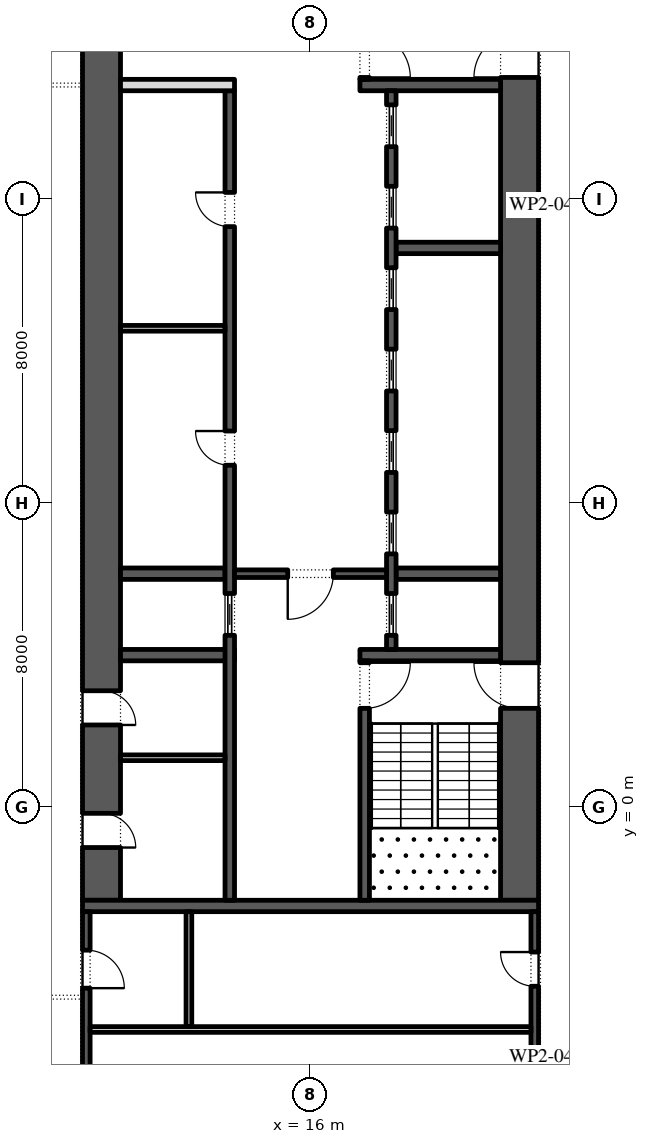
"""IFC4 building model, lengths in metres.
Left out: names, types, materials, properties, quantities, classifications, styles, units other than length and angle.
Written with IfcOpenShell. Run it as: python <this file> out.ifc"""

import sys

from ifc_helpers import new_model, si_unit, direction, frame, frame_2d, origin, place, context, subcontext, project, spatial, rectangle, extrude, element, fill, save


model = new_model("IFC4")
c1 = context("Model", 3, precision=1e-05, world=origin(), true_north=direction((0.0, 1.0)))
c2 = subcontext(c1, "Body", "Model", "MODEL_VIEW")
j1 = project(units=[si_unit("LENGTHUNIT", "METRE"), si_unit("PLANEANGLEUNIT", "RADIAN")], contexts=[c1])
p1 = place(None, origin())
s1 = spatial("IfcSite", under=j1, at=p1, CompositionType="ELEMENT")
p2 = place(p1, origin())
s2 = spatial("IfcBuilding", under=s1, at=p2, CompositionType="ELEMENT")
p3 = place(p2, frame((0.0, 0.0, 64.8)))
s3 = spatial("IfcBuildingStorey", under=s2, at=p3, CompositionType="ELEMENT", Elevation=64.8)
p4 = place(p3, frame((21.5, -2.45, 0.0), z_axis=(0.0, 0.0, 1.0), x_axis=(0.0, 1.0, 0.0)))
e1 = element("IfcWall", 1, at=p4, inside=s3, PredefinedType="SHEAR", context=c2, shape_type="SweptSolid", body=[
    extrude(rectangle(XDim=27.9, YDim=1.0, at=frame_2d((13.95, 0.0))), origin(), (0.0, 0.0, 1.0), 4.0),
])
p5 = place(p4, frame((5.05, 0.0, 0.0)))
e2 = element("IfcOpeningElement", 2, at=p5, cuts=e1, PredefinedType="OPENING", context=c2, shape_type="SweptSolid", body=[
    extrude(rectangle(XDim=1.2, YDim=2.1, at=frame_2d((0.6, 1.05))), frame((0.0, 0.51, 0.0), z_axis=(0.0, -1.0, 0.0), x_axis=(1.0, 0.0, 0.0)), (0.0, 0.0, 1.0), 1.02),
])
p6 = place(p4, frame((21.65, 0.0, 0.0)))
e3 = element("IfcOpeningElement", 3, at=p6, cuts=e1, PredefinedType="OPENING", context=c2, shape_type="SweptSolid", body=[
    extrude(rectangle(XDim=1.2, YDim=2.1, at=frame_2d((0.6, 1.05))), frame((0.0, 0.51, 0.0), z_axis=(0.0, -1.0, 0.0), x_axis=(1.0, 0.0, 0.0)), (0.0, 0.0, 1.0), 1.02),
])
p7 = place(p3, frame((10.5, -2.45, 0.0), z_axis=(0.0, 0.0, 1.0), x_axis=(0.0, 1.0, 0.0)))
e4 = element("IfcWall", 4, at=p7, inside=s3, PredefinedType="SHEAR", context=c2, shape_type="SweptSolid", body=[
    extrude(rectangle(XDim=27.9, YDim=1.0, at=frame_2d((13.95, 0.0))), origin(), (0.0, 0.0, 1.0), 4.0),
])
p8 = place(p7, frame((23.65, 0.0, 0.0)))
e5 = element("IfcOpeningElement", 5, at=p8, cuts=e4, PredefinedType="OPENING", context=c2, shape_type="SweptSolid", body=[
    extrude(rectangle(XDim=2.4, YDim=2.1, at=frame_2d((1.2, 1.05))), frame((0.0, 0.51, 0.0), z_axis=(0.0, -1.0, 0.0), x_axis=(1.0, 0.0, 0.0)), (0.0, 0.0, 1.0), 1.02),
])
p9 = place(p7, frame((1.387, 0.0, 0.0)))
e6 = element("IfcOpeningElement", 6, at=p9, cuts=e4, PredefinedType="OPENING", context=c2, shape_type="SweptSolid", body=[
    extrude(rectangle(XDim=0.9, YDim=2.1, at=frame_2d((0.45, 1.05))), frame((0.0, 0.51, 0.0), z_axis=(0.0, -1.0, 0.0), x_axis=(1.0, 0.0, 0.0)), (0.0, 0.0, 1.0), 1.02),
])
p10 = place(p7, frame((4.613, 0.0, 0.0)))
e7 = element("IfcOpeningElement", 7, at=p10, cuts=e4, PredefinedType="OPENING", context=c2, shape_type="SweptSolid", body=[
    extrude(rectangle(XDim=0.9, YDim=2.1, at=frame_2d((0.45, 1.05))), frame((0.0, 0.51, 0.0), z_axis=(0.0, -1.0, 0.0), x_axis=(1.0, 0.0, 0.0)), (0.0, 0.0, 1.0), 1.02),
])
p11 = place(p3, frame((10.0, -2.6, 0.0), z_axis=(0.0, 0.0, 1.0), x_axis=(1.0, 0.0, 0.0)))
e8 = element("IfcWall", 8, at=p11, inside=s3, PredefinedType="SHEAR", context=c2, shape_type="SweptSolid", body=[
    extrude(rectangle(XDim=12.0, YDim=0.3, at=frame_2d((6.0, 0.0))), origin(), (0.0, 0.0, 1.0), 4.0),
])
p12 = place(p3, frame((17.3, 4.0, 0.0), z_axis=(0.0, 0.0, 1.0), x_axis=(1.0, 0.0, 0.0)))
e9 = element("IfcWall", 9, at=p12, inside=s3, PredefinedType="SHEAR", context=c2, shape_type="SweptSolid", body=[
    extrude(rectangle(XDim=3.7, YDim=0.3, at=frame_2d((1.85, 0.0))), origin(), (0.0, 0.0, 1.0), 4.0),
])
p13 = place(p3, frame((17.425, -2.45, 0.0), z_axis=(0.0, 0.0, 1.0), x_axis=(0.0, 1.0, 0.0)))
e10 = element("IfcWall", 10, at=p13, inside=s3, PredefinedType="SHEAR", context=c2, shape_type="SweptSolid", body=[
    extrude(rectangle(XDim=6.3, YDim=0.25, at=frame_2d((3.15, 0.0))), origin(), (0.0, 0.0, 1.0), 4.0),
])
p14 = place(p13, frame((5.05, 0.0, 0.0)))
e11 = element("IfcOpeningElement", 11, at=p14, cuts=e10, PredefinedType="OPENING", context=c2, shape_type="SweptSolid", body=[
    extrude(rectangle(XDim=1.2, YDim=2.1, at=frame_2d((0.6, 1.05))), frame((0.0, 0.135, 0.0), z_axis=(0.0, -1.0, 0.0), x_axis=(1.0, 0.0, 0.0)), (0.0, 0.0, 1.0), 0.27),
])
p15 = place(p3, frame((17.3, 19.0, 0.0), z_axis=(0.0, 0.0, 1.0), x_axis=(1.0, 0.0, 0.0)))
e12 = element("IfcWall", 12, at=p15, inside=s3, PredefinedType="SHEAR", context=c2, shape_type="SweptSolid", body=[
    extrude(rectangle(XDim=3.7, YDim=0.3, at=frame_2d((1.85, 0.0))), origin(), (0.0, 0.0, 1.0), 4.0),
])
p16 = place(p3, frame((17.425, 19.15, 0.0), z_axis=(0.0, 0.0, 1.0), x_axis=(0.0, 1.0, 0.0)))
e13 = element("IfcWall", 13, at=p16, inside=s3, PredefinedType="SHEAR", context=c2, shape_type="SweptSolid", body=[
    extrude(rectangle(XDim=6.3, YDim=0.25, at=frame_2d((3.15, 0.0))), origin(), (0.0, 0.0, 1.0), 4.0),
])
p17 = place(p16, frame((0.05, 0.0, 0.0)))
e14 = element("IfcOpeningElement", 14, at=p17, cuts=e13, PredefinedType="OPENING", context=c2, shape_type="SweptSolid", body=[
    extrude(rectangle(XDim=1.2, YDim=2.1, at=frame_2d((0.6, 1.05))), frame((0.0, 0.135, 0.0), z_axis=(0.0, -1.0, 0.0), x_axis=(1.0, 0.0, 0.0)), (0.0, 0.0, 1.0), 0.27),
])
for number, where, z_axis, x_axis in (
    (15, (18.25, 6.143, 0.0), (0.0, 0.0, 1.0), (1.0, 0.0, 0.0)),
    (16, (18.25, 14.714, 0.0), (0.0, 0.0, 1.0), (1.0, 0.0, 0.0)),
):
    element("IfcWall", number, at=place(p3, frame(where, z_axis=z_axis, x_axis=x_axis)), inside=s3, PredefinedType="SHEAR", context=c2, shape_type="SweptSolid", body=[
        extrude(rectangle(XDim=2.75, YDim=0.3, at=frame_2d((1.375, 0.0))), origin(), (0.0, 0.0, 1.0), 4.0),
    ])
p18 = place(p3, frame((18.125, 4.15, 0.0), z_axis=(0.0, 0.0, 1.0), x_axis=(0.0, 1.0, 0.0)))
e17 = element("IfcWall", 17, at=p18, inside=s3, PredefinedType="SHEAR", context=c2, shape_type="SweptSolid", body=[
    extrude(rectangle(XDim=14.7, YDim=0.25, at=frame_2d((7.35, 0.0))), origin(), (0.0, 0.0, 1.0), 4.0),
])
p19 = place(p18, frame((0.371, 0.0, 0.0)))
e18 = element("IfcOpeningElement", 18, at=p19, cuts=e17, PredefinedType="OPENING", context=c2, shape_type="SweptSolid", body=[
    extrude(rectangle(XDim=1.1, YDim=2.1, at=frame_2d((0.55, 1.05))), frame((0.0, 0.135, 0.0), z_axis=(0.0, -1.0, 0.0), x_axis=(1.0, 0.0, 0.0)), (0.0, 0.0, 1.0), 0.27),
])
p20 = place(p18, frame((2.514, 0.0, 0.0)))
e19 = element("IfcOpeningElement", 19, at=p20, cuts=e17, PredefinedType="OPENING", context=c2, shape_type="SweptSolid", body=[
    extrude(rectangle(XDim=1.1, YDim=2.1, at=frame_2d((0.55, 1.05))), frame((0.0, 0.135, 0.0), z_axis=(0.0, -1.0, 0.0), x_axis=(1.0, 0.0, 0.0)), (0.0, 0.0, 1.0), 0.27),
])
p21 = place(p18, frame((4.657, 0.0, 0.0)))
e20 = element("IfcOpeningElement", 20, at=p21, cuts=e17, PredefinedType="OPENING", context=c2, shape_type="SweptSolid", body=[
    extrude(rectangle(XDim=1.1, YDim=2.1, at=frame_2d((0.55, 1.05))), frame((0.0, 0.135, 0.0), z_axis=(0.0, -1.0, 0.0), x_axis=(1.0, 0.0, 0.0)), (0.0, 0.0, 1.0), 0.27),
])
p22 = place(p18, frame((6.8, 0.0, 0.0)))
e21 = element("IfcOpeningElement", 21, at=p22, cuts=e17, PredefinedType="OPENING", context=c2, shape_type="SweptSolid", body=[
    extrude(rectangle(XDim=1.1, YDim=2.1, at=frame_2d((0.55, 1.05))), frame((0.0, 0.135, 0.0), z_axis=(0.0, -1.0, 0.0), x_axis=(1.0, 0.0, 0.0)), (0.0, 0.0, 1.0), 0.27),
])
p23 = place(p18, frame((8.943, 0.0, 0.0)))
e22 = element("IfcOpeningElement", 22, at=p23, cuts=e17, PredefinedType="OPENING", context=c2, shape_type="SweptSolid", body=[
    extrude(rectangle(XDim=1.1, YDim=2.1, at=frame_2d((0.55, 1.05))), frame((0.0, 0.135, 0.0), z_axis=(0.0, -1.0, 0.0), x_axis=(1.0, 0.0, 0.0)), (0.0, 0.0, 1.0), 0.27),
])
p24 = place(p18, frame((11.086, 0.0, 0.0)))
e23 = element("IfcOpeningElement", 23, at=p24, cuts=e17, PredefinedType="OPENING", context=c2, shape_type="SweptSolid", body=[
    extrude(rectangle(XDim=1.1, YDim=2.1, at=frame_2d((0.55, 1.05))), frame((0.0, 0.135, 0.0), z_axis=(0.0, -1.0, 0.0), x_axis=(1.0, 0.0, 0.0)), (0.0, 0.0, 1.0), 0.27),
])
p25 = place(p18, frame((13.229, 0.0, 0.0)))
e24 = element("IfcOpeningElement", 24, at=p25, cuts=e17, PredefinedType="OPENING", context=c2, shape_type="SweptSolid", body=[
    extrude(rectangle(XDim=1.1, YDim=2.1, at=frame_2d((0.55, 1.05))), frame((0.0, 0.135, 0.0), z_axis=(0.0, -1.0, 0.0), x_axis=(1.0, 0.0, 0.0)), (0.0, 0.0, 1.0), 0.27),
])
p26 = place(p3, frame((11.0, 4.0, 0.0), z_axis=(0.0, 0.0, 1.0), x_axis=(1.0, 0.0, 0.0)))
e25 = element("IfcWall", 25, at=p26, inside=s3, PredefinedType="SHEAR", context=c2, shape_type="SweptSolid", body=[
    extrude(rectangle(XDim=3.0, YDim=0.3, at=frame_2d((1.5, 0.0))), origin(), (0.0, 0.0, 1.0), 4.0),
])
p27 = place(p3, frame((11.0, 6.143, 0.0), z_axis=(0.0, 0.0, 1.0), x_axis=(1.0, 0.0, 0.0)))
e26 = element("IfcWall", 26, at=p27, inside=s3, PredefinedType="SHEAR", context=c2, shape_type="SweptSolid", body=[
    extrude(rectangle(XDim=2.75, YDim=0.3, at=frame_2d((1.375, 0.0))), origin(), (0.0, 0.0, 1.0), 4.0),
])
p28 = place(p3, frame((13.875, -2.45, 0.0), z_axis=(0.0, 0.0, 1.0), x_axis=(0.0, 1.0, 0.0)))
e27 = element("IfcWall", 27, at=p28, inside=s3, PredefinedType="SHEAR", context=c2, shape_type="SweptSolid", body=[
    extrude(rectangle(XDim=21.3, YDim=0.25, at=frame_2d((10.65, 0.0))), origin(), (0.0, 0.0, 1.0), 4.0),
])
p29 = place(p28, frame((11.446, 0.0, 0.0)))
e28 = element("IfcOpeningElement", 28, at=p29, cuts=e27, PredefinedType="OPENING", context=c2, shape_type="SweptSolid", body=[
    extrude(rectangle(XDim=0.9, YDim=2.1, at=frame_2d((0.45, 1.05))), frame((0.0, 0.135, 0.0), z_axis=(0.0, -1.0, 0.0), x_axis=(1.0, 0.0, 0.0)), (0.0, 0.0, 1.0), 0.27),
])
p30 = place(p28, frame((17.725, 0.0, 0.0)))
e29 = element("IfcOpeningElement", 29, at=p30, cuts=e27, PredefinedType="OPENING", context=c2, shape_type="SweptSolid", body=[
    extrude(rectangle(XDim=0.9, YDim=2.1, at=frame_2d((0.45, 1.05))), frame((0.0, 0.135, 0.0), z_axis=(0.0, -1.0, 0.0), x_axis=(1.0, 0.0, 0.0)), (0.0, 0.0, 1.0), 0.27),
])
p31 = place(p28, frame((6.971, 0.0, 0.0)))
e30 = element("IfcOpeningElement", 30, at=p31, cuts=e27, PredefinedType="OPENING", context=c2, shape_type="SweptSolid", body=[
    extrude(rectangle(XDim=1.1, YDim=2.1, at=frame_2d((0.55, 1.05))), frame((0.0, 0.135, 0.0), z_axis=(0.0, -1.0, 0.0), x_axis=(1.0, 0.0, 0.0)), (0.0, 0.0, 1.0), 0.27),
])
p32 = place(p3, frame((11.0, 19.0, 0.0), z_axis=(0.0, 0.0, 1.0), x_axis=(1.0, 0.0, 0.0)))
e31 = element("IfcWall", 31, at=p32, inside=s3, PredefinedType="PARTITIONING", context=c2, shape_type="SweptSolid", body=[
    extrude(rectangle(XDim=3.0, YDim=0.3, at=frame_2d((1.5, 0.0))), origin(), (0.0, 0.0, 1.0), 4.0),
])
p33 = place(p3, frame((11.0, 12.6, 0.0), z_axis=(0.0, 0.0, 1.0), x_axis=(1.0, 0.0, 0.0)))
e32 = element("IfcWall", 32, at=p33, inside=s3, PredefinedType="PARTITIONING", context=c2, shape_type="SweptSolid", body=[
    extrude(rectangle(XDim=2.75, YDim=0.15, at=frame_2d((1.375, 0.0))), origin(), (0.0, 0.0, 1.0), 4.0),
])
p34 = place(p3, frame((14.0, 6.143, 0.0), z_axis=(0.0, 0.0, 1.0), x_axis=(1.0, 0.0, 0.0)))
e33 = element("IfcWall", 33, at=p34, inside=s3, PredefinedType="SHEAR", context=c2, shape_type="SweptSolid", body=[
    extrude(rectangle(XDim=4.0, YDim=0.2, at=frame_2d((2.0, 0.0))), origin(), (0.0, 0.0, 1.0), 4.0),
])
p35 = place(p34, frame((1.4, 0.0, 0.0)))
e34 = element("IfcOpeningElement", 34, at=p35, cuts=e33, PredefinedType="OPENING", context=c2, shape_type="SweptSolid", body=[
    extrude(rectangle(XDim=1.2, YDim=2.1, at=frame_2d((0.6, 1.05))), frame((0.0, 0.11, 0.0), z_axis=(0.0, -1.0, 0.0), x_axis=(1.0, 0.0, 0.0)), (0.0, 0.0, 1.0), 0.22),
])
p36 = place(p3, frame((11.0, 1.3, 0.0), z_axis=(0.0, 0.0, 1.0), x_axis=(1.0, 0.0, 0.0)))
e35 = element("IfcWall", 35, at=p36, inside=s3, PredefinedType="PARTITIONING", context=c2, shape_type="SweptSolid", body=[
    extrude(rectangle(XDim=2.75, YDim=0.15, at=frame_2d((1.375, 0.0))), origin(), (0.0, 0.0, 1.0), 4.0),
])
p37 = place(p3, frame((21.9, -15.8, 0.0), z_axis=(0.0, 0.0, 1.0), x_axis=(0.0, 1.0, 0.0)))
e36 = element("IfcWall", 36, at=p37, inside=s3, PredefinedType="SHEAR", context=c2, shape_type="SweptSolid", body=[
    extrude(rectangle(XDim=13.05, YDim=0.2, at=frame_2d((6.525, 0.0))), origin(), (0.0, 0.0, 1.0), 4.0),
])
p38 = place(p37, frame((11.087, 0.0, 0.0)))
e37 = element("IfcOpeningElement", 37, at=p38, cuts=e36, PredefinedType="OPENING", context=c2, shape_type="SweptSolid", body=[
    extrude(rectangle(XDim=0.9, YDim=2.1, at=frame_2d((0.45, 1.05))), frame((0.0, 0.11, 0.0), z_axis=(0.0, -1.0, 0.0), x_axis=(1.0, 0.0, 0.0)), (0.0, 0.0, 1.0), 0.22),
])
p39 = place(p3, frame((10.1, -15.8, 0.0), z_axis=(0.0, 0.0, 1.0), x_axis=(0.0, 1.0, 0.0)))
e38 = element("IfcWall", 38, at=p39, inside=s3, PredefinedType="SHEAR", context=c2, shape_type="SweptSolid", body=[
    extrude(rectangle(XDim=13.05, YDim=0.2, at=frame_2d((6.525, 0.0))), origin(), (0.0, 0.0, 1.0), 4.0),
])
p40 = place(p39, frame((4.488, 0.0, 0.0)))
e39 = element("IfcOpeningElement", 39, at=p40, cuts=e38, PredefinedType="OPENING", context=c2, shape_type="SweptSolid", body=[
    extrude(rectangle(XDim=0.9, YDim=2.1, at=frame_2d((0.45, 1.05))), frame((0.0, 0.11, 0.0), z_axis=(0.0, -1.0, 0.0), x_axis=(1.0, 0.0, 0.0)), (0.0, 0.0, 1.0), 0.22),
])
p41 = place(p39, frame((11.038, 0.0, 0.0)))
e40 = element("IfcOpeningElement", 40, at=p41, cuts=e38, PredefinedType="OPENING", context=c2, shape_type="SweptSolid", body=[
    extrude(rectangle(XDim=1.0, YDim=2.1, at=frame_2d((0.5, 1.05))), frame((0.0, 0.11, 0.0), z_axis=(0.0, -1.0, 0.0), x_axis=(1.0, 0.0, 0.0)), (0.0, 0.0, 1.0), 0.22),
])
p42 = place(p3, frame((10.2, -5.85, 0.0), z_axis=(0.0, 0.0, 1.0), x_axis=(1.0, 0.0, 0.0)))
e41 = element("IfcWall", 41, at=p42, inside=s3, PredefinedType="PARTITIONING", context=c2, shape_type="SweptSolid", body=[
    extrude(rectangle(XDim=11.6, YDim=0.15, at=frame_2d((5.8, 0.0))), origin(), (0.0, 0.0, 1.0), 4.0),
])
p43 = place(p3, frame((12.8, -5.775, 0.0), z_axis=(0.0, 0.0, 1.0), x_axis=(0.0, 1.0, 0.0)))
e42 = element("IfcWall", 42, at=p43, inside=s3, PredefinedType="PARTITIONING", context=c2, shape_type="SweptSolid", body=[
    extrude(rectangle(XDim=3.025, YDim=0.15, at=frame_2d((1.512, 0.0))), origin(), (0.0, 0.0, 1.0), 4.0),
])
p44 = place(p19, origin())
e43 = element("IfcDoor", 43, at=p44, inside=s3, OperationType="SLIDING_TO_LEFT", PredefinedType="DOOR", context=c2, shape_type="SweptSolid", body=[
    extrude(rectangle(XDim=1.1, YDim=2.1, at=frame_2d((0.55, 1.05))), frame((0.0, 0.025, 0.0), z_axis=(0.0, -1.0, 0.0), x_axis=(1.0, 0.0, 0.0)), (0.0, 0.0, 1.0), 0.05),
])
fill(e18, e43)
p45 = place(p20, origin())
e44 = element("IfcDoor", 44, at=p45, inside=s3, OperationType="SLIDING_TO_LEFT", PredefinedType="DOOR", context=c2, shape_type="SweptSolid", body=[
    extrude(rectangle(XDim=1.1, YDim=2.1, at=frame_2d((0.55, 1.05))), frame((0.0, 0.025, 0.0), z_axis=(0.0, -1.0, 0.0), x_axis=(1.0, 0.0, 0.0)), (0.0, 0.0, 1.0), 0.05),
])
fill(e19, e44)
p46 = place(p21, origin())
e45 = element("IfcDoor", 45, at=p46, inside=s3, OperationType="SLIDING_TO_LEFT", PredefinedType="DOOR", context=c2, shape_type="SweptSolid", body=[
    extrude(rectangle(XDim=1.1, YDim=2.1, at=frame_2d((0.55, 1.05))), frame((0.0, 0.025, 0.0), z_axis=(0.0, -1.0, 0.0), x_axis=(1.0, 0.0, 0.0)), (0.0, 0.0, 1.0), 0.05),
])
fill(e20, e45)
p47 = place(p22, origin())
e46 = element("IfcDoor", 46, at=p47, inside=s3, OperationType="SLIDING_TO_LEFT", PredefinedType="DOOR", context=c2, shape_type="SweptSolid", body=[
    extrude(rectangle(XDim=1.1, YDim=2.1, at=frame_2d((0.55, 1.05))), frame((0.0, 0.025, 0.0), z_axis=(0.0, -1.0, 0.0), x_axis=(1.0, 0.0, 0.0)), (0.0, 0.0, 1.0), 0.05),
])
fill(e21, e46)
p48 = place(p23, origin())
e47 = element("IfcDoor", 47, at=p48, inside=s3, OperationType="SLIDING_TO_LEFT", PredefinedType="DOOR", context=c2, shape_type="SweptSolid", body=[
    extrude(rectangle(XDim=1.1, YDim=2.1, at=frame_2d((0.55, 1.05))), frame((0.0, 0.025, 0.0), z_axis=(0.0, -1.0, 0.0), x_axis=(1.0, 0.0, 0.0)), (0.0, 0.0, 1.0), 0.05),
])
fill(e22, e47)
p49 = place(p24, origin())
e48 = element("IfcDoor", 48, at=p49, inside=s3, OperationType="SLIDING_TO_LEFT", PredefinedType="DOOR", context=c2, shape_type="SweptSolid", body=[
    extrude(rectangle(XDim=1.1, YDim=2.1, at=frame_2d((0.55, 1.05))), frame((0.0, 0.025, 0.0), z_axis=(0.0, -1.0, 0.0), x_axis=(1.0, 0.0, 0.0)), (0.0, 0.0, 1.0), 0.05),
])
fill(e23, e48)
p50 = place(p25, origin())
e49 = element("IfcDoor", 49, at=p50, inside=s3, OperationType="SLIDING_TO_LEFT", PredefinedType="DOOR", context=c2, shape_type="SweptSolid", body=[
    extrude(rectangle(XDim=1.1, YDim=2.1, at=frame_2d((0.55, 1.05))), frame((0.0, 0.025, 0.0), z_axis=(0.0, -1.0, 0.0), x_axis=(1.0, 0.0, 0.0)), (0.0, 0.0, 1.0), 0.05),
])
fill(e24, e49)
p51 = place(p29, origin())
e50 = element("IfcDoor", 50, at=p51, inside=s3, OperationType="SINGLE_SWING_LEFT", PredefinedType="DOOR", context=c2, shape_type="SweptSolid", body=[
    extrude(rectangle(XDim=0.9, YDim=2.1, at=frame_2d((0.45, 1.05))), frame((0.0, 0.125, 0.0), z_axis=(0.0, -1.0, 0.0), x_axis=(1.0, 0.0, 0.0)), (0.0, 0.0, 1.0), 0.05),
])
fill(e28, e50)
p52 = place(p30, origin())
e51 = element("IfcDoor", 51, at=p52, inside=s3, OperationType="SINGLE_SWING_LEFT", PredefinedType="DOOR", context=c2, shape_type="SweptSolid", body=[
    extrude(rectangle(XDim=0.9, YDim=2.1, at=frame_2d((0.45, 1.05))), frame((0.0, 0.125, 0.0), z_axis=(0.0, -1.0, 0.0), x_axis=(1.0, 0.0, 0.0)), (0.0, 0.0, 1.0), 0.05),
])
fill(e29, e51)
p53 = place(p31, origin())
e52 = element("IfcDoor", 52, at=p53, inside=s3, OperationType="SLIDING_TO_LEFT", PredefinedType="DOOR", context=c2, shape_type="SweptSolid", body=[
    extrude(rectangle(XDim=1.1, YDim=2.1, at=frame_2d((0.55, 1.05))), frame((0.0, 0.025, 0.0), z_axis=(0.0, -1.0, 0.0), x_axis=(1.0, 0.0, 0.0)), (0.0, 0.0, 1.0), 0.05),
])
fill(e30, e52)
p54 = place(p35, frame((1.2, 0.0, 0.0), z_axis=(0.0, 0.0, 1.0), x_axis=(-1.0, 0.0, 0.0)))
e53 = element("IfcDoor", 53, at=p54, inside=s3, OperationType="SINGLE_SWING_LEFT", PredefinedType="DOOR", context=c2, shape_type="SweptSolid", body=[
    extrude(rectangle(XDim=1.2, YDim=2.1, at=frame_2d((0.6, 1.05))), frame((0.0, 0.025, 0.0), z_axis=(0.0, -1.0, 0.0), x_axis=(1.0, 0.0, 0.0)), (0.0, 0.0, 1.0), 0.05),
])
fill(e34, e53)
p55 = place(p14, frame((1.2, 0.0, 0.0), z_axis=(0.0, 0.0, 1.0), x_axis=(-1.0, 0.0, 0.0)))
e54 = element("IfcDoor", 54, at=p55, inside=s3, OperationType="SINGLE_SWING_RIGHT", PredefinedType="DOOR", context=c2, shape_type="SweptSolid", body=[
    extrude(rectangle(XDim=1.2, YDim=2.1, at=frame_2d((0.6, 1.05))), frame((0.0, 0.025, 0.0), z_axis=(0.0, -1.0, 0.0), x_axis=(1.0, 0.0, 0.0)), (0.0, 0.0, 1.0), 0.05),
])
fill(e11, e54)
p56 = place(p5, origin())
e55 = element("IfcDoor", 55, at=p56, inside=s3, OperationType="SINGLE_SWING_LEFT", PredefinedType="DOOR", context=c2, shape_type="SweptSolid", body=[
    extrude(rectangle(XDim=1.2, YDim=2.1, at=frame_2d((0.6, 1.05))), frame((0.0, 0.025, 0.0), z_axis=(0.0, -1.0, 0.0), x_axis=(1.0, 0.0, 0.0)), (0.0, 0.0, 1.0), 0.05),
])
fill(e2, e55)
p57 = place(p17, frame((1.2, 0.0, 0.0), z_axis=(0.0, 0.0, 1.0), x_axis=(-1.0, 0.0, 0.0)))
e56 = element("IfcDoor", 56, at=p57, inside=s3, OperationType="SINGLE_SWING_LEFT", PredefinedType="DOOR", context=c2, shape_type="SweptSolid", body=[
    extrude(rectangle(XDim=1.2, YDim=2.1, at=frame_2d((0.6, 1.05))), frame((0.0, 0.025, 0.0), z_axis=(0.0, -1.0, 0.0), x_axis=(1.0, 0.0, 0.0)), (0.0, 0.0, 1.0), 0.05),
])
fill(e14, e56)
p58 = place(p6, origin())
e57 = element("IfcDoor", 57, at=p58, inside=s3, OperationType="SINGLE_SWING_RIGHT", PredefinedType="DOOR", context=c2, shape_type="SweptSolid", body=[
    extrude(rectangle(XDim=1.2, YDim=2.1, at=frame_2d((0.6, 1.05))), frame((0.0, 0.025, 0.0), z_axis=(0.0, -1.0, 0.0), x_axis=(1.0, 0.0, 0.0)), (0.0, 0.0, 1.0), 0.05),
])
fill(e3, e57)
p59 = place(p9, frame((0.9, -0.95, 0.0), z_axis=(0.0, 0.0, 1.0), x_axis=(-1.0, 0.0, 0.0)))
e58 = element("IfcDoor", 58, at=p59, inside=s3, OperationType="SINGLE_SWING_LEFT", PredefinedType="DOOR", context=c2, shape_type="SweptSolid", body=[
    extrude(rectangle(XDim=0.9, YDim=2.1, at=frame_2d((0.45, 1.05))), frame((0.0, -0.45, 0.0), z_axis=(0.0, -1.0, 0.0), x_axis=(1.0, 0.0, 0.0)), (0.0, 0.0, 1.0), 0.05),
])
fill(e6, e58)
p60 = place(p10, frame((0.9, -0.95, 0.0), z_axis=(0.0, 0.0, 1.0), x_axis=(-1.0, 0.0, 0.0)))
e59 = element("IfcDoor", 59, at=p60, inside=s3, OperationType="SINGLE_SWING_LEFT", PredefinedType="DOOR", context=c2, shape_type="SweptSolid", body=[
    extrude(rectangle(XDim=0.9, YDim=2.1, at=frame_2d((0.45, 1.05))), frame((0.0, -0.45, 0.0), z_axis=(0.0, -1.0, 0.0), x_axis=(1.0, 0.0, 0.0)), (0.0, 0.0, 1.0), 0.05),
])
fill(e7, e59)
p61 = place(p41, frame((1.0, -0.15, 0.0), z_axis=(0.0, 0.0, 1.0), x_axis=(-1.0, 0.0, 0.0)))
e60 = element("IfcDoor", 60, at=p61, inside=s3, OperationType="SINGLE_SWING_LEFT", PredefinedType="DOOR", context=c2, shape_type="SweptSolid", body=[
    extrude(rectangle(XDim=1.0, YDim=2.1, at=frame_2d((0.5, 1.05))), frame((0.0, -0.05, 0.0), z_axis=(0.0, -1.0, 0.0), x_axis=(1.0, 0.0, 0.0)), (0.0, 0.0, 1.0), 0.05),
])
fill(e40, e60)
p62 = place(p38, origin())
e61 = element("IfcDoor", 61, at=p62, inside=s3, OperationType="SINGLE_SWING_LEFT", PredefinedType="DOOR", context=c2, shape_type="SweptSolid", body=[
    extrude(rectangle(XDim=0.9, YDim=2.1, at=frame_2d((0.45, 1.05))), frame((0.0, 0.1, 0.0), z_axis=(0.0, -1.0, 0.0), x_axis=(1.0, 0.0, 0.0)), (0.0, 0.0, 1.0), 0.05),
])
fill(e37, e61)
save(model, sys.argv[1])
